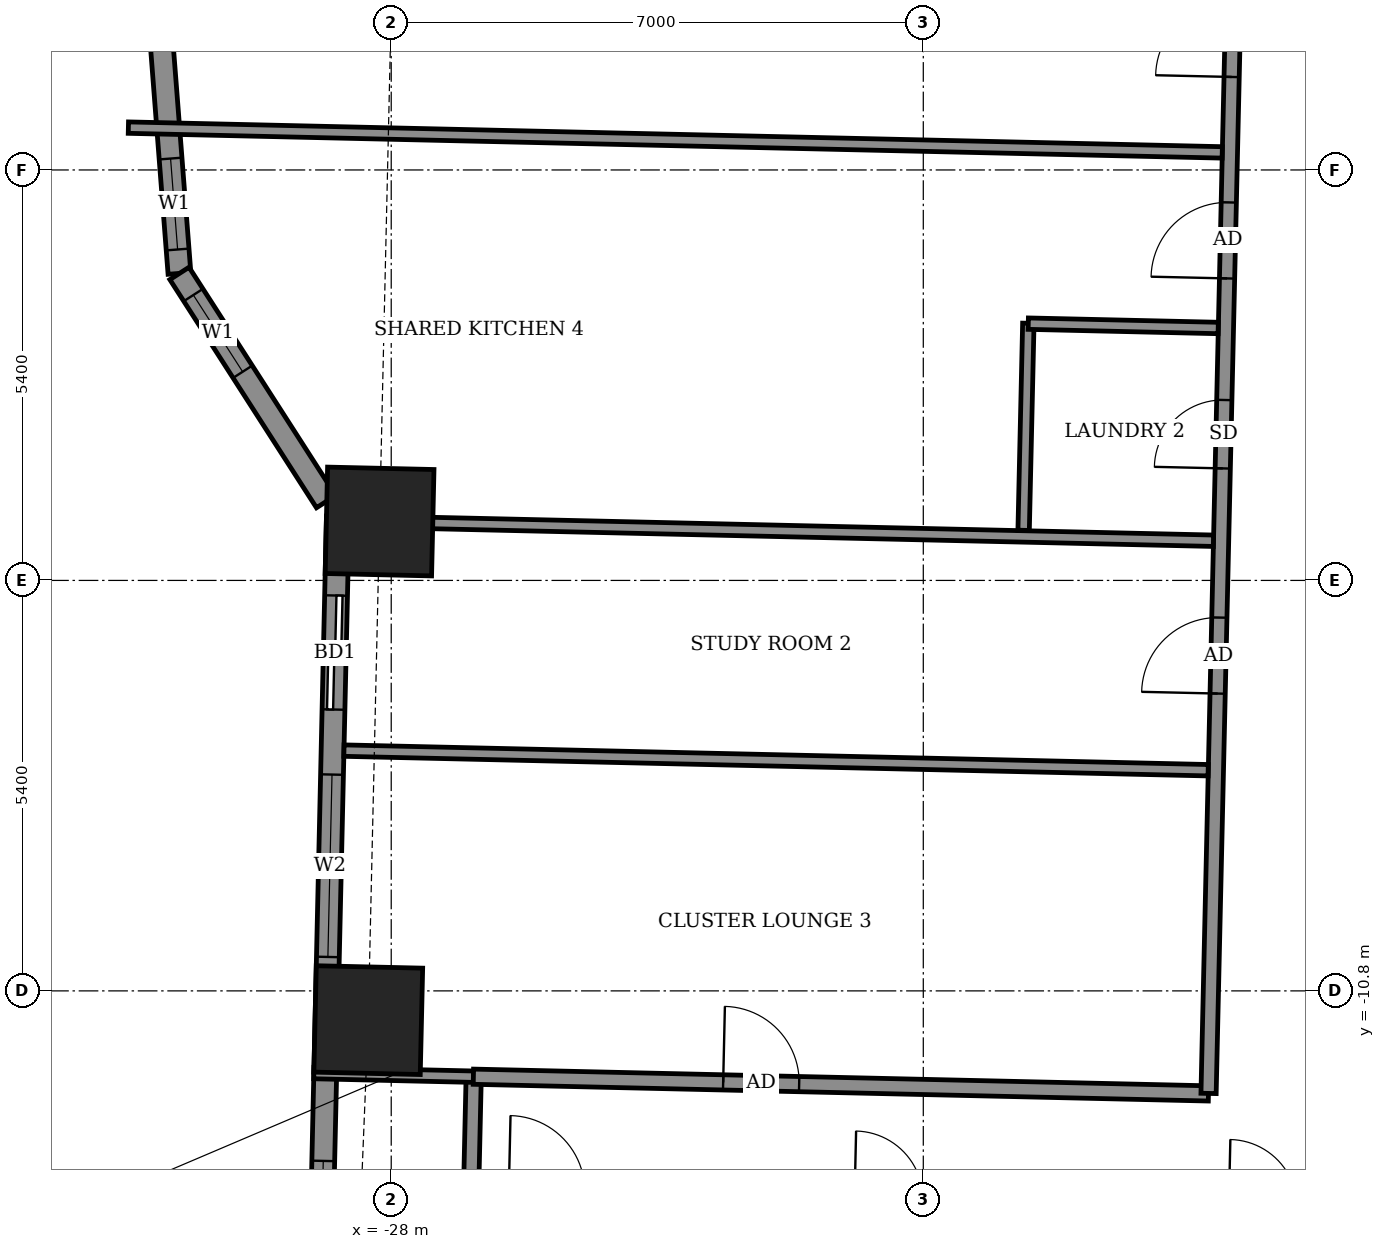
"""IFC4 building model, lengths in metres.
Left out: names, types, materials, properties, quantities, classifications, styles, units other than length and angle.
Written with IfcOpenShell. Run it as: python <this file> out.ifc"""

import sys

from ifc_helpers import new_model, si_unit, direction, frame, frame_2d, origin, origin_2d, place, context, subcontext, project, spatial, rectangle, extrude, element, fill, save


model = new_model("IFC4")
c1 = context("Model", 3, precision=1e-05, world=origin(), true_north=direction((0.0, 1.0)))
c2 = subcontext(c1, "Body", "Model", "MODEL_VIEW")
j1 = project(units=[si_unit("LENGTHUNIT", "METRE"), si_unit("PLANEANGLEUNIT", "RADIAN")], contexts=[c1])
p1 = place(None, origin())
s1 = spatial("IfcSite", under=j1, at=p1, CompositionType="ELEMENT")
p2 = place(p1, origin())
s2 = spatial("IfcBuilding", under=s1, at=p2, CompositionType="ELEMENT")
p3 = place(p2, frame((0.0, 0.0, 101.9)))
s3 = spatial("IfcBuildingStorey", under=s2, at=p3, CompositionType="ELEMENT", Elevation=101.9)
for number, where, z_axis, x_axis in (
    (1, (-28.153, -4.625, -0.55), (0.0, 0.0, 1.0), (-0.023, -1.0, 0.0)),
    (2, (-28.302, -11.185, -0.55), (0.0, 0.0, 1.0), (-0.023, -1.0, 0.0)),
):
    element("IfcColumn", number, at=place(p3, frame(where, z_axis=z_axis, x_axis=x_axis)), inside=s3, PredefinedType="COLUMN", context=c2, shape_type="SweptSolid", body=[
        extrude(rectangle(XDim=1.4, YDim=1.4, at=origin_2d()), origin(), (0.0, 0.0, 1.0), 3.6),
    ])
p4 = place(p3, frame((-31.216, 4.196, 0.0), z_axis=(0.0, 0.0, 1.0), x_axis=(0.077178825362, -0.997017266107, 0.0)))
e3 = element("IfcWall", 3, at=p4, inside=s3, PredefinedType="SOLIDWALL", context=c2, shape_type="SweptSolid", body=[
    extrude(rectangle(XDim=5.574, YDim=0.3, at=frame_2d((2.787, 0.0))), origin(), (0.0, 0.0, 1.0), 3.05),
])
p5 = place(p4, frame((4.058, 0.0, 0.9)))
e4 = element("IfcOpeningElement", 4, at=p5, cuts=e3, PredefinedType="OPENING", context=c2, shape_type="SweptSolid", body=[
    extrude(rectangle(XDim=1.2, YDim=1.5, at=frame_2d((0.6, 0.75))), frame((0.0, 0.16, 0.0), z_axis=(0.0, -1.0, 0.0), x_axis=(1.0, 0.0, 0.0)), (0.0, 0.0, 1.0), 0.32),
])
p6 = place(p3, frame((-30.786, -1.361, 0.0), z_axis=(0.0, 0.0, 1.0), x_axis=(0.54058467792, -0.841289608873, 0.0)))
e5 = element("IfcWall", 5, at=p6, inside=s3, PredefinedType="SOLIDWALL", context=c2, shape_type="SweptSolid", body=[
    extrude(rectangle(XDim=3.568, YDim=0.3, at=frame_2d((1.784, 0.0))), origin(), (0.0, 0.0, 1.0), 3.05),
])
p7 = place(p6, frame((0.338, 0.0, 0.9)))
e6 = element("IfcOpeningElement", 6, at=p7, cuts=e5, PredefinedType="OPENING", context=c2, shape_type="SweptSolid", body=[
    extrude(rectangle(XDim=1.2, YDim=1.5, at=frame_2d((0.6, 0.75))), frame((0.0, 0.16, 0.0), z_axis=(0.0, -1.0, 0.0), x_axis=(1.0, 0.0, 0.0)), (0.0, 0.0, 1.0), 0.32),
])
p8 = place(p3, frame((-28.702, -4.557, 0.0), z_axis=(0.0, 0.0, 1.0), x_axis=(-0.022653729471, -0.999743371341, 0.0)))
e7 = element("IfcWall", 7, at=p8, inside=s3, PredefinedType="SOLIDWALL", context=c2, shape_type="SweptSolid", body=[
    extrude(rectangle(XDim=13.03, YDim=0.3, at=frame_2d((6.515, 0.0))), origin(), (0.0, 0.0, 1.0), 3.05),
])
p9 = place(p8, frame((1.042, 0.0, 0.0)))
e8 = element("IfcOpeningElement", 8, at=p9, cuts=e7, PredefinedType="OPENING", context=c2, shape_type="SweptSolid", body=[
    extrude(rectangle(XDim=1.5, YDim=2.4, at=frame_2d((0.75, 1.2))), frame((0.0, 0.16, 0.0), z_axis=(0.0, -1.0, 0.0), x_axis=(1.0, 0.0, 0.0)), (0.0, 0.0, 1.0), 0.32),
])
p10 = place(p8, frame((3.398, 0.0, 0.9)))
e9 = element("IfcOpeningElement", 9, at=p10, cuts=e7, PredefinedType="OPENING", context=c2, shape_type="SweptSolid", body=[
    extrude(rectangle(XDim=2.4, YDim=1.5, at=frame_2d((1.2, 0.75))), frame((0.0, 0.16, 0.0), z_axis=(0.0, -1.0, 0.0), x_axis=(1.0, 0.0, 0.0)), (0.0, 0.0, 1.0), 0.32),
])
p11 = place(p8, frame((8.482, 0.0, 0.9)))
e10 = element("IfcOpeningElement", 10, at=p11, cuts=e7, PredefinedType="OPENING", context=c2, shape_type="SweptSolid", body=[
    extrude(rectangle(XDim=2.4, YDim=1.5, at=frame_2d((1.2, 0.75))), frame((0.0, 0.16, 0.0), z_axis=(0.0, -1.0, 0.0), x_axis=(1.0, 0.0, 0.0)), (0.0, 0.0, 1.0), 0.32),
])
p12 = place(p3, frame((-31.652, -12.672, 0.0), z_axis=(0.0, 0.0, 1.0), x_axis=(0.022662255828, 0.999743178102, 0.0)))
e11 = element("IfcWall", 11, at=p12, inside=s3, PredefinedType="USERDEFINED", context=c2, shape_type="SweptSolid", body=[
    extrude(rectangle(XDim=6.0, YDim=0.55, at=frame_2d((3.0, 0.0))), origin(), (0.0, 0.0, 1.0), 0.8),
])
p13 = place(p3, frame((-26.949, -13.429, 0.0), z_axis=(0.0, 0.0, 1.0), x_axis=(0.022617910375, 0.999744182344, 0.0)))
e12 = element("IfcWall", 12, at=p13, inside=s3, PredefinedType="PARTITIONING", context=c2, shape_type="SweptSolid", body=[
    extrude(rectangle(XDim=1.5, YDim=0.2, at=frame_2d((0.75, 0.0))), origin(), (0.0, 0.0, 1.0), 3.05),
])
p14 = place(p3, frame((-29.018, -11.881, 0.0), z_axis=(0.0, 0.0, 1.0), x_axis=(0.999741236023, -0.022747769011, 0.0)))
e13 = element("IfcWall", 13, at=p14, inside=s3, PredefinedType="PARTITIONING", context=c2, shape_type="SweptSolid", body=[
    extrude(rectangle(XDim=2.104, YDim=0.15, at=frame_2d((1.052, 0.0))), origin(), (0.0, 0.0, 1.0), 2.55),
])
p15 = place(p3, frame((-26.919, -11.929, 0.0), z_axis=(0.0, 0.0, 1.0), x_axis=(0.999741418429, -0.022739751035, 0.0)))
e14 = element("IfcWall", 14, at=p15, inside=s3, PredefinedType="PARTITIONING", context=c2, shape_type="SweptSolid", body=[
    extrude(rectangle(XDim=9.673, YDim=0.2, at=frame_2d((4.837, 0.0))), origin(), (0.0, 0.0, 1.0), 3.05),
])
p16 = place(p15, frame((3.287, 0.0, 0.0)))
e15 = element("IfcOpeningElement", 15, at=p16, cuts=e14, PredefinedType="OPENING", context=c2, shape_type="SweptSolid", body=[
    extrude(rectangle(XDim=1.0, YDim=2.1, at=frame_2d((0.5, 1.05))), frame((0.0, 0.11, 0.0), z_axis=(0.0, -1.0, 0.0), x_axis=(1.0, 0.0, 0.0)), (0.0, 0.0, 1.0), 0.22),
])
p17 = place(p3, frame((-17.247, -12.149, 0.0), z_axis=(0.0, 0.0, 1.0), x_axis=(0.022696191528, 0.999742408268, 0.0)))
e16 = element("IfcWall", 16, at=p17, inside=s3, PredefinedType="PARTITIONING", context=c2, shape_type="SweptSolid", body=[
    extrude(rectangle(XDim=25.074, YDim=0.2, at=frame_2d((12.537, 0.0))), origin(), (0.0, 0.0, 1.0), 3.05),
])
p18 = place(p17, frame((17.604, 0.0, 0.0)))
e17 = element("IfcOpeningElement", 17, at=p18, cuts=e16, PredefinedType="OPENING", context=c2, shape_type="SweptSolid", body=[
    extrude(rectangle(XDim=1.0, YDim=2.1, at=frame_2d((0.5, 1.05))), frame((0.0, 0.11, 0.0), z_axis=(0.0, -1.0, 0.0), x_axis=(1.0, 0.0, 0.0)), (0.0, 0.0, 1.0), 0.22),
])
p19 = place(p17, frame((13.376, 0.0, 0.0)))
e18 = element("IfcOpeningElement", 18, at=p19, cuts=e16, PredefinedType="OPENING", context=c2, shape_type="SweptSolid", body=[
    extrude(rectangle(XDim=1.0, YDim=2.1, at=frame_2d((0.5, 1.05))), frame((0.0, 0.11, 0.0), z_axis=(0.0, -1.0, 0.0), x_axis=(1.0, 0.0, 0.0)), (0.0, 0.0, 1.0), 0.22),
])
p20 = place(p17, frame((10.725, 0.0, 0.0)))
e19 = element("IfcOpeningElement", 19, at=p20, cuts=e16, PredefinedType="OPENING", context=c2, shape_type="SweptSolid", body=[
    extrude(rectangle(XDim=1.0, YDim=2.1, at=frame_2d((0.5, 1.05))), frame((0.0, 0.11, 0.0), z_axis=(0.0, -1.0, 0.0), x_axis=(1.0, 0.0, 0.0)), (0.0, 0.0, 1.0), 0.22),
])
p21 = place(p17, frame((8.225, 0.0, 0.0)))
e20 = element("IfcOpeningElement", 20, at=p21, cuts=e16, PredefinedType="OPENING", context=c2, shape_type="SweptSolid", body=[
    extrude(rectangle(XDim=0.9, YDim=2.1, at=frame_2d((0.45, 1.05))), frame((0.0, 0.11, 0.0), z_axis=(0.0, -1.0, 0.0), x_axis=(1.0, 0.0, 0.0)), (0.0, 0.0, 1.0), 0.22),
])
p22 = place(p17, frame((5.262, 0.0, 0.0)))
e21 = element("IfcOpeningElement", 21, at=p22, cuts=e16, PredefinedType="OPENING", context=c2, shape_type="SweptSolid", body=[
    extrude(rectangle(XDim=1.0, YDim=2.1, at=frame_2d((0.5, 1.05))), frame((0.0, 0.11, 0.0), z_axis=(0.0, -1.0, 0.0), x_axis=(1.0, 0.0, 0.0)), (0.0, 0.0, 1.0), 0.22),
])
p23 = place(p3, frame((-28.622, -7.639, 0.0), z_axis=(0.0, 0.0, 1.0), x_axis=(0.999742544331, -0.022690197315, 0.0)))
e22 = element("IfcWall", 22, at=p23, inside=s3, PredefinedType="PARTITIONING", context=c2, shape_type="SweptSolid", body=[
    extrude(rectangle(XDim=11.373, YDim=0.15, at=frame_2d((5.687, 0.0))), origin(), (0.0, 0.0, 1.0), 2.55),
])
p24 = place(p3, frame((-28.553, -4.62, 0.0), z_axis=(0.0, 0.0, 1.0), x_axis=(0.999743020026, -0.022669228257, 0.0)))
e23 = element("IfcWall", 23, at=p24, inside=s3, PredefinedType="PARTITIONING", context=c2, shape_type="SweptSolid", body=[
    extrude(rectangle(XDim=11.373, YDim=0.15, at=frame_2d((5.687, 0.0))), origin(), (0.0, 0.0, 1.0), 3.05),
])
p25 = place(p3, frame((-19.68, -4.741, 0.0), z_axis=(0.0, 0.0, 1.0), x_axis=(0.022760079124, 0.999740955847, 0.0)))
e24 = element("IfcWall", 24, at=p25, inside=s3, PredefinedType="PARTITIONING", context=c2, shape_type="SweptSolid", body=[
    extrude(rectangle(XDim=2.725, YDim=0.15, at=frame_2d((1.362, 0.0))), origin(), (0.0, 0.0, 1.0), 3.05),
])
p26 = place(p3, frame((-19.619, -2.022, 0.0), z_axis=(0.0, 0.0, 1.0), x_axis=(0.999738750294, -0.02285675306, 0.0)))
e25 = element("IfcWall", 25, at=p26, inside=s3, PredefinedType="PARTITIONING", context=c2, shape_type="SweptSolid", body=[
    extrude(rectangle(XDim=2.5, YDim=0.15, at=frame_2d((1.25, 0.0))), origin(), (0.0, 0.0, 1.0), 3.05),
])
p27 = place(p3, frame((-31.458, 0.557, 0.0), z_axis=(0.0, 0.0, 1.0), x_axis=(0.999743636126, -0.022642041092, 0.0)))
e26 = element("IfcWall", 26, at=p27, inside=s3, PredefinedType="PARTITIONING", context=c2, shape_type="SweptSolid", body=[
    extrude(rectangle(XDim=14.395, YDim=0.15, at=frame_2d((7.197, 0.0))), origin(), (0.0, 0.0, 1.0), 2.1),
])
p28 = place(p5, origin())
e27 = element("IfcWindow", 27, at=p28, inside=s3, PartitioningType="SINGLE_PANEL", PredefinedType="WINDOW", context=c2, shape_type="SweptSolid", body=[
    extrude(rectangle(XDim=1.2, YDim=1.5, at=frame_2d((0.6, 0.75))), frame((0.0, 0.03, 0.0), z_axis=(0.0, -1.0, 0.0), x_axis=(1.0, 0.0, 0.0)), (0.0, 0.0, 1.0), 0.06),
])
fill(e4, e27)
p29 = place(p7, origin())
e28 = element("IfcWindow", 28, at=p29, inside=s3, PartitioningType="SINGLE_PANEL", PredefinedType="WINDOW", context=c2, shape_type="SweptSolid", body=[
    extrude(rectangle(XDim=1.2, YDim=1.5, at=frame_2d((0.6, 0.75))), frame((0.0, 0.03, 0.0), z_axis=(0.0, -1.0, 0.0), x_axis=(1.0, 0.0, 0.0)), (0.0, 0.0, 1.0), 0.06),
])
fill(e6, e28)
p30 = place(p9, origin())
e29 = element("IfcDoor", 29, at=p30, inside=s3, OperationType="SLIDING_TO_LEFT", PredefinedType="DOOR", context=c2, shape_type="SweptSolid", body=[
    extrude(rectangle(XDim=1.5, YDim=2.4, at=frame_2d((0.75, 1.2))), frame((0.0, 0.025, 0.0), z_axis=(0.0, -1.0, 0.0), x_axis=(1.0, 0.0, 0.0)), (0.0, 0.0, 1.0), 0.05),
])
fill(e8, e29)
p31 = place(p10, origin())
e30 = element("IfcWindow", 30, at=p31, inside=s3, PartitioningType="DOUBLE_PANEL_VERTICAL", PredefinedType="WINDOW", context=c2, shape_type="SweptSolid", body=[
    extrude(rectangle(XDim=2.4, YDim=1.5, at=frame_2d((1.2, 0.75))), frame((0.0, 0.03, 0.0), z_axis=(0.0, -1.0, 0.0), x_axis=(1.0, 0.0, 0.0)), (0.0, 0.0, 1.0), 0.06),
])
fill(e9, e30)
p32 = place(p11, origin())
e31 = element("IfcWindow", 31, at=p32, inside=s3, PartitioningType="DOUBLE_PANEL_VERTICAL", PredefinedType="WINDOW", context=c2, shape_type="SweptSolid", body=[
    extrude(rectangle(XDim=2.4, YDim=1.5, at=frame_2d((1.2, 0.75))), frame((0.0, 0.03, 0.0), z_axis=(0.0, -1.0, 0.0), x_axis=(1.0, 0.0, 0.0)), (0.0, 0.0, 1.0), 0.06),
])
fill(e10, e31)
p33 = place(p19, origin())
e32 = element("IfcDoor", 32, at=p33, inside=s3, OperationType="SINGLE_SWING_LEFT", PredefinedType="DOOR", context=c2, shape_type="SweptSolid", body=[
    extrude(rectangle(XDim=1.0, YDim=2.1, at=frame_2d((0.5, 1.05))), frame((0.0, 0.025, 0.0), z_axis=(0.0, -1.0, 0.0), x_axis=(1.0, 0.0, 0.0)), (0.0, 0.0, 1.0), 0.05),
])
fill(e18, e32)
p34 = place(p20, origin())
e33 = element("IfcDoor", 33, at=p34, inside=s3, OperationType="SINGLE_SWING_RIGHT", PredefinedType="DOOR", context=c2, shape_type="SweptSolid", body=[
    extrude(rectangle(XDim=1.0, YDim=2.1, at=frame_2d((0.5, 1.05))), frame((0.0, 0.025, 0.0), z_axis=(0.0, -1.0, 0.0), x_axis=(1.0, 0.0, 0.0)), (0.0, 0.0, 1.0), 0.05),
])
fill(e19, e33)
p35 = place(p21, origin())
e34 = element("IfcDoor", 34, at=p35, inside=s3, OperationType="SINGLE_SWING_RIGHT", PredefinedType="DOOR", context=c2, shape_type="SweptSolid", body=[
    extrude(rectangle(XDim=0.9, YDim=2.1, at=frame_2d((0.45, 1.05))), frame((0.0, 0.025, 0.0), z_axis=(0.0, -1.0, 0.0), x_axis=(1.0, 0.0, 0.0)), (0.0, 0.0, 1.0), 0.05),
])
fill(e20, e34)
p36 = place(p22, origin())
e35 = element("IfcDoor", 35, at=p36, inside=s3, OperationType="SINGLE_SWING_LEFT", PredefinedType="DOOR", context=c2, shape_type="SweptSolid", body=[
    extrude(rectangle(XDim=1.0, YDim=2.1, at=frame_2d((0.5, 1.05))), frame((0.0, 0.025, 0.0), z_axis=(0.0, -1.0, 0.0), x_axis=(1.0, 0.0, 0.0)), (0.0, 0.0, 1.0), 0.05),
])
fill(e21, e35)
p37 = place(p16, origin())
e36 = element("IfcDoor", 36, at=p37, inside=s3, OperationType="SINGLE_SWING_RIGHT", PredefinedType="DOOR", context=c2, shape_type="SweptSolid", body=[
    extrude(rectangle(XDim=1.0, YDim=2.1, at=frame_2d((0.5, 1.05))), frame((0.0, 0.025, 0.0), z_axis=(0.0, -1.0, 0.0), x_axis=(1.0, 0.0, 0.0)), (0.0, 0.0, 1.0), 0.05),
])
fill(e15, e36)
save(model, sys.argv[1])
